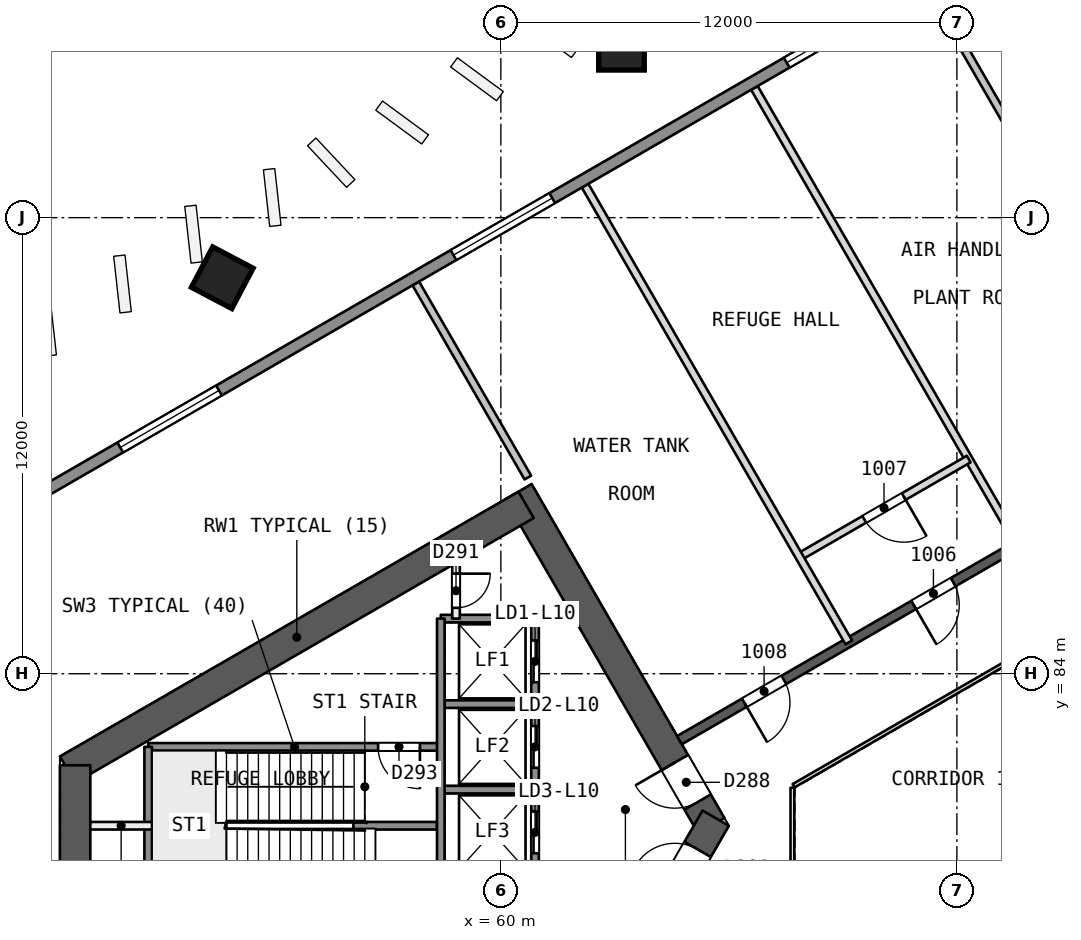
"""IFC4 building model, lengths in metres.
Left out: names, types, materials, properties, quantities, classifications, styles, units other than length and angle.
Written with IfcOpenShell. Run it as: python <this file> out.ifc"""

import sys

from ifc_helpers import new_model, si_unit, direction, frame, frame_2d, origin, origin_2d, place, context, subcontext, project, spatial, rectangle, extrude, element, fill, save


model = new_model("IFC4")
c1 = context("Model", 3, precision=1e-05, world=origin(), true_north=direction((0.0, 1.0)))
c2 = subcontext(c1, "Body", "Model", "MODEL_VIEW")
j1 = project(units=[si_unit("LENGTHUNIT", "METRE"), si_unit("PLANEANGLEUNIT", "RADIAN")], contexts=[c1])
p1 = place(None, origin())
s1 = spatial("IfcSite", under=j1, at=p1, CompositionType="ELEMENT")
p2 = place(p1, origin())
s2 = spatial("IfcBuilding", under=s1, at=p2, CompositionType="ELEMENT")
p3 = place(p2, frame((0.0, 0.0, 48.5)))
s3 = spatial("IfcBuildingStorey", under=s2, at=p3, CompositionType="ELEMENT", Elevation=48.5)
p4 = place(p3, frame((65.538, 80.0, 0.0), z_axis=(0.0, 0.0, 1.0), x_axis=(-0.49999662545, 0.866027352073, 0.0)))
e1 = element("IfcWall", 1, at=p4, inside=s3, PredefinedType="SHEAR", context=c2, shape_type="SweptSolid", body=[
    extrude(rectangle(XDim=10.149, YDim=0.8, at=frame_2d((5.074, 0.0))), origin(), (0.0, 0.0, 1.0), 4.4),
])
p5 = place(p4, frame((0.719, 0.0, 0.0)))
e2 = element("IfcOpeningElement", 2, at=p5, cuts=e1, PredefinedType="OPENING", context=c2, shape_type="SweptSolid", body=[
    extrude(rectangle(XDim=1.2, YDim=2.1, at=frame_2d((0.6, 1.05))), frame((0.0, 0.411, 0.0), z_axis=(0.0, -1.0, 0.0), x_axis=(1.0, 0.0, 0.0)), (0.0, 0.0, 1.0), 0.821),
])
p6 = place(p3, frame((60.664, 88.443, 0.0), z_axis=(0.0, 0.0, 1.0), x_axis=(-0.866029478545, -0.499992942241, 0.0)))
e3 = element("IfcWall", 3, at=p6, inside=s3, PredefinedType="SHEAR", context=c2, shape_type="SweptSolid", body=[
    extrude(rectangle(XDim=13.933, YDim=0.8, at=frame_2d((6.967, 0.0))), origin(), (0.0, 0.0, 1.0), 4.4),
])
p7 = place(p3, frame((48.797, 81.592, 0.0), z_axis=(0.0, 0.0, 1.0), x_axis=(0.0, -1.0, 0.0)))
e4 = element("IfcWall", 4, at=p7, inside=s3, PredefinedType="SHEAR", context=c2, shape_type="SweptSolid", body=[
    extrude(rectangle(XDim=3.415, YDim=0.8, at=frame_2d((1.707, 0.0))), origin(), (0.0, 0.0, 1.0), 4.4),
])
p8 = place(p3, frame((60.664, 71.557, 0.0), z_axis=(0.0, 0.0, 1.0), x_axis=(0.50000409368, 0.866023040284, 0.0)))
e5 = element("IfcWall", 5, at=p8, inside=s3, PredefinedType="SHEAR", context=c2, shape_type="SweptSolid", body=[
    extrude(rectangle(XDim=9.98, YDim=0.8, at=frame_2d((4.99, 0.0))), origin(), (0.0, 0.0, 1.0), 4.4),
])
p9 = place(p8, frame((7.83, 0.0, 0.0)))
e6 = element("IfcOpeningElement", 6, at=p9, cuts=e5, PredefinedType="OPENING", context=c2, shape_type="SweptSolid", body=[
    extrude(rectangle(XDim=1.2, YDim=2.1, at=frame_2d((0.6, 1.05))), frame((0.0, 0.411, 0.0), z_axis=(0.0, -1.0, 0.0), x_axis=(1.0, 0.0, 0.0)), (0.0, 0.0, 1.0), 0.821),
])
p10 = place(p3, frame((78.2, 90.046, 0.0), z_axis=(0.0, 0.0, 1.0), x_axis=(-0.866026492143, -0.499998114903, 0.0)))
e7 = element("IfcWall", 7, at=p10, inside=s3, PredefinedType="SHEAR", context=c2, shape_type="SweptSolid", body=[
    extrude(rectangle(XDim=15.588, YDim=0.25, at=frame_2d((7.794, 0.0))), origin(), (0.0, 0.0, 1.0), 3.9),
])
p11 = place(p10, frame((2.05, 0.0, 0.0)))
e8 = element("IfcOpeningElement", 8, at=p11, cuts=e7, PredefinedType="OPENING", context=c2, shape_type="SweptSolid", body=[
    extrude(rectangle(XDim=1.2, YDim=2.4, at=frame_2d((0.6, 1.2))), frame((0.0, 0.135, 0.0), z_axis=(0.0, -1.0, 0.0), x_axis=(1.0, 0.0, 0.0)), (0.0, 0.0, 1.0), 0.271),
])
p12 = place(p10, frame((7.272, 0.0, 0.0)))
e9 = element("IfcOpeningElement", 9, at=p12, cuts=e7, PredefinedType="OPENING", context=c2, shape_type="SweptSolid", body=[
    extrude(rectangle(XDim=1.2, YDim=2.4, at=frame_2d((0.6, 1.2))), frame((0.0, 0.135, 0.0), z_axis=(0.0, -1.0, 0.0), x_axis=(1.0, 0.0, 0.0)), (0.0, 0.0, 1.0), 0.271),
])
p13 = place(p10, frame((12.417, 0.0, 0.0)))
e10 = element("IfcOpeningElement", 10, at=p13, cuts=e7, PredefinedType="OPENING", context=c2, shape_type="SweptSolid", body=[
    extrude(rectangle(XDim=1.2, YDim=2.4, at=frame_2d((0.6, 1.2))), frame((0.0, 0.135, 0.0), z_axis=(0.0, -1.0, 0.0), x_axis=(1.0, 0.0, 0.0)), (0.0, 0.0, 1.0), 0.271),
])
p14 = place(p3, frame((63.162, 100.504, 0.0), z_axis=(0.010041240412, -0.017475086904, 0.999796876785), x_axis=(0.867052242695, 0.49821723017, 1.09398e-07)))
e11 = element("IfcColumn", 11, at=p14, inside=s3, PredefinedType="COLUMN", context=c2, shape_type="SweptSolid", body=[
    extrude(rectangle(XDim=1.2, YDim=1.2, at=origin_2d()), origin(), (0.0, 0.0, 1.0), 4.401),
])
p15 = place(p3, frame((52.646, 94.433, 0.0), z_axis=(0.019360161379, -0.012148639948, 0.999738763227), x_axis=(-0.500505187473, 0.865497615784, 0.020209759643)))
e12 = element("IfcColumn", 12, at=p15, inside=s3, PredefinedType="COLUMN", context=c2, shape_type="SweptSolid", body=[
    extrude(rectangle(XDim=1.2, YDim=1.2, at=origin_2d()), origin(), (0.0, 0.0, 1.0), 4.401),
])
p16 = place(p3, frame((66.671, 99.414, 0.0), z_axis=(0.0, 0.0, 1.0), x_axis=(0.500010269051, -0.866019474864, 0.0)))
e13 = element("IfcWall", 13, at=p16, inside=s3, PredefinedType="PARTITIONING", context=c2, shape_type="SweptSolid", body=[
    extrude(rectangle(XDim=13.878, YDim=0.2, at=frame_2d((6.939, 0.0))), origin(), (0.0, 0.0, 1.0), 3.9),
])
p17 = place(p3, frame((71.261, 102.064, 0.0), z_axis=(0.0, 0.0, 1.0), x_axis=(0.499985191823, -0.866033953121, 0.0)))
e14 = element("IfcWall", 14, at=p17, inside=s3, PredefinedType="PARTITIONING", context=c2, shape_type="SweptSolid", body=[
    extrude(rectangle(XDim=5.899, YDim=0.2, at=frame_2d((2.949, 0.0))), origin(), (0.0, 0.0, 1.0), 3.9),
])
p18 = place(p3, frame((72.31, 89.647, 0.0), z_axis=(0.0, 0.0, 1.0), x_axis=(-0.866035426308, -0.499982640079, 0.0)))
e15 = element("IfcWall", 15, at=p18, inside=s3, PredefinedType="PARTITIONING", context=c2, shape_type="SweptSolid", body=[
    extrude(rectangle(XDim=5.144, YDim=0.2, at=frame_2d((2.572, 0.0))), origin(), (0.0, 0.0, 1.0), 3.9),
])
p19 = place(p18, frame((1.972, 0.0, 0.0)))
e16 = element("IfcOpeningElement", 16, at=p19, cuts=e15, PredefinedType="OPENING", context=c2, shape_type="SweptSolid", body=[
    extrude(rectangle(XDim=1.2, YDim=2.4, at=frame_2d((0.6, 1.2))), frame((0.0, 0.11, 0.0), z_axis=(0.0, -1.0, 0.0), x_axis=(1.0, 0.0, 0.0)), (0.0, 0.0, 1.0), 0.221),
])
p20 = place(p3, frame((62.216, 96.842, 0.0), z_axis=(0.0, 0.0, 1.0), x_axis=(0.499997074782, -0.866027092653, 0.0)))
e17 = element("IfcWall", 17, at=p20, inside=s3, PredefinedType="PARTITIONING", context=c2, shape_type="SweptSolid", body=[
    extrude(rectangle(XDim=13.877, YDim=0.2, at=frame_2d((6.939, 0.0))), origin(), (0.0, 0.0, 1.0), 3.9),
])
p21 = place(p3, frame((60.71, 89.162, 0.0), z_axis=(0.0, 0.0, 1.0), x_axis=(-0.499985191823, 0.866033953121, 0.0)))
e18 = element("IfcWall", 18, at=p21, inside=s3, PredefinedType="PARTITIONING", context=c2, shape_type="SweptSolid", body=[
    extrude(rectangle(XDim=5.899, YDim=0.2, at=frame_2d((2.949, 0.0))), origin(), (0.0, 0.0, 1.0), 3.9),
])
p22 = place(p3, frame((38.131, 83.108, 0.0), z_axis=(0.0, 0.0, 1.0), x_axis=(0.866025105017, 0.50000051748, 0.0)))
e19 = element("IfcWall", 19, at=p22, inside=s3, PredefinedType="SOLIDWALL", context=c2, shape_type="SweptSolid", body=[
    extrude(rectangle(XDim=60.751, YDim=0.3, at=frame_2d((30.375, 0.0))), origin(), (0.0, 0.0, 1.0), 3.9),
])
p23 = place(p22, frame((3.562, 0.0, 0.6)))
e20 = element("IfcOpeningElement", 20, at=p23, cuts=e19, PredefinedType="OPENING", context=c2, shape_type="SweptSolid", body=[
    extrude(rectangle(XDim=3.0, YDim=2.4, at=frame_2d((1.5, 1.2))), frame((0.0, 0.161, 0.0), z_axis=(0.0, -1.0, 0.0), x_axis=(1.0, 0.0, 0.0)), (0.0, 0.0, 1.0), 0.321),
])
p24 = place(p22, frame((13.688, 0.0, 0.6)))
e21 = element("IfcOpeningElement", 21, at=p24, cuts=e19, PredefinedType="OPENING", context=c2, shape_type="SweptSolid", body=[
    extrude(rectangle(XDim=3.0, YDim=2.4, at=frame_2d((1.5, 1.2))), frame((0.0, 0.161, 0.0), z_axis=(0.0, -1.0, 0.0), x_axis=(1.0, 0.0, 0.0)), (0.0, 0.0, 1.0), 0.321),
])
p25 = place(p22, frame((23.813, 0.0, 0.6)))
e22 = element("IfcOpeningElement", 22, at=p25, cuts=e19, PredefinedType="OPENING", context=c2, shape_type="SweptSolid", body=[
    extrude(rectangle(XDim=3.0, YDim=2.4, at=frame_2d((1.5, 1.2))), frame((0.0, 0.161, 0.0), z_axis=(0.0, -1.0, 0.0), x_axis=(1.0, 0.0, 0.0)), (0.0, 0.0, 1.0), 0.321),
])
p26 = place(p22, frame((33.938, 0.0, 0.6)))
e23 = element("IfcOpeningElement", 23, at=p26, cuts=e19, PredefinedType="OPENING", context=c2, shape_type="SweptSolid", body=[
    extrude(rectangle(XDim=3.0, YDim=2.4, at=frame_2d((1.5, 1.2))), frame((0.0, 0.161, 0.0), z_axis=(0.0, -1.0, 0.0), x_axis=(1.0, 0.0, 0.0)), (0.0, 0.0, 1.0), 0.321),
])
p27 = place(p22, frame((44.063, 0.0, 0.6)))
e24 = element("IfcOpeningElement", 24, at=p27, cuts=e19, PredefinedType="OPENING", context=c2, shape_type="SweptSolid", body=[
    extrude(rectangle(XDim=3.0, YDim=2.4, at=frame_2d((1.5, 1.2))), frame((0.0, 0.161, 0.0), z_axis=(0.0, -1.0, 0.0), x_axis=(1.0, 0.0, 0.0)), (0.0, 0.0, 1.0), 0.321),
])
p28 = place(p22, frame((54.188, 0.0, 0.6)))
e25 = element("IfcOpeningElement", 25, at=p28, cuts=e19, PredefinedType="OPENING", context=c2, shape_type="SweptSolid", body=[
    extrude(rectangle(XDim=3.0, YDim=2.4, at=frame_2d((1.5, 1.2))), frame((0.0, 0.161, 0.0), z_axis=(0.0, -1.0, 0.0), x_axis=(1.0, 0.0, 0.0)), (0.0, 0.0, 1.0), 0.321),
])
for number, where, z_axis, x_axis in (
    (26, (60.9, 85.45, 0.0), (0.0, 0.0, 1.0), (-1.0, 0.0, 0.0)),
    (27, (60.9, 83.2, 0.0), (0.0, 0.0, 1.0), (-1.0, 0.0, 0.0)),
):
    element("IfcWall", number, at=place(p3, frame(where, z_axis=z_axis, x_axis=x_axis)), inside=s3, PredefinedType="SOLIDWALL", context=c2, shape_type="SweptSolid", body=[
        extrude(rectangle(XDim=2.48, YDim=0.2, at=frame_2d((1.24, 0.0))), origin(), (0.0, 0.0, 1.0), 3.9),
    ])
p29 = place(p3, frame((58.42, 82.075, 0.0), z_axis=(0.0, 0.0, 1.0), x_axis=(-1.0, 0.0, 0.0)))
e28 = element("IfcWall", 28, at=p29, inside=s3, PredefinedType="SOLIDWALL", context=c2, shape_type="SweptSolid", body=[
    extrude(rectangle(XDim=7.7, YDim=0.2, at=frame_2d((3.85, 0.0))), origin(), (0.0, 0.0, 1.0), 3.9),
])
p30 = place(p29, frame((0.55, 0.0, 0.0)))
e29 = element("IfcOpeningElement", 29, at=p30, cuts=e28, PredefinedType="OPENING", context=c2, shape_type="SweptSolid", body=[
    extrude(rectangle(XDim=1.1, YDim=2.1, at=frame_2d((0.55, 1.05))), frame((0.0, 0.11, 0.0), z_axis=(0.0, -1.0, 0.0), x_axis=(1.0, 0.0, 0.0)), (0.0, 0.0, 1.0), 0.221),
])
p31 = place(p3, frame((60.9, 80.95, 0.0), z_axis=(0.0, 0.0, 1.0), x_axis=(-1.0, 0.0, 0.0)))
e30 = element("IfcWall", 30, at=p31, inside=s3, PredefinedType="SOLIDWALL", context=c2, shape_type="SweptSolid", body=[
    extrude(rectangle(XDim=2.48, YDim=0.2, at=frame_2d((1.24, 0.0))), origin(), (0.0, 0.0, 1.0), 3.9),
])
p32 = place(p3, frame((58.32, 80.0, 0.0), z_axis=(0.0, 0.0, 1.0), x_axis=(-1.0, 0.0, 0.0)))
e31 = element("IfcWall", 31, at=p32, inside=s3, PredefinedType="SOLIDWALL", context=c2, shape_type="SweptSolid", body=[
    extrude(rectangle(XDim=2.2, YDim=0.2, at=frame_2d((1.1, 0.0))), origin(), (0.0, 0.0, 1.0), 3.9),
])
p33 = place(p3, frame((50.82, 80.0, 0.0), z_axis=(0.0, 0.0, 1.0), x_axis=(-1.0, 0.0, 0.0)))
e32 = element("IfcWall", 32, at=p33, inside=s3, PredefinedType="PARTITIONING", context=c2, shape_type="SweptSolid", body=[
    extrude(rectangle(XDim=1.623, YDim=0.2, at=frame_2d((0.812, 0.0))), origin(), (0.0, 0.0, 1.0), 3.9),
])
p34 = place(p3, frame((60.9, 85.45, 0.0), z_axis=(0.0, 0.0, 1.0), x_axis=(0.0, -1.0, 0.0)))
e33 = element("IfcWall", 33, at=p34, inside=s3, PredefinedType="SOLIDWALL", context=c2, shape_type="SweptSolid", body=[
    extrude(rectangle(XDim=10.9, YDim=0.2, at=frame_2d((5.45, 0.0))), origin(), (0.0, 0.0, 1.0), 3.9),
])
p35 = place(p34, frame((0.575, 0.0, 0.0)))
e34 = element("IfcOpeningElement", 34, at=p35, cuts=e33, PredefinedType="OPENING", context=c2, shape_type="SweptSolid", body=[
    extrude(rectangle(XDim=1.1, YDim=2.1, at=frame_2d((0.55, 1.05))), frame((0.0, 0.11, 0.0), z_axis=(0.0, -1.0, 0.0), x_axis=(1.0, 0.0, 0.0)), (0.0, 0.0, 1.0), 0.221),
])
p36 = place(p34, frame((2.825, 0.0, 0.0)))
e35 = element("IfcOpeningElement", 35, at=p36, cuts=e33, PredefinedType="OPENING", context=c2, shape_type="SweptSolid", body=[
    extrude(rectangle(XDim=1.1, YDim=2.1, at=frame_2d((0.55, 1.05))), frame((0.0, 0.11, 0.0), z_axis=(0.0, -1.0, 0.0), x_axis=(1.0, 0.0, 0.0)), (0.0, 0.0, 1.0), 0.221),
])
p37 = place(p34, frame((5.075, 0.0, 0.0)))
e36 = element("IfcOpeningElement", 36, at=p37, cuts=e33, PredefinedType="OPENING", context=c2, shape_type="SweptSolid", body=[
    extrude(rectangle(XDim=1.1, YDim=2.1, at=frame_2d((0.55, 1.05))), frame((0.0, 0.11, 0.0), z_axis=(0.0, -1.0, 0.0), x_axis=(1.0, 0.0, 0.0)), (0.0, 0.0, 1.0), 0.221),
])
p38 = place(p34, frame((7.325, 0.0, 0.0)))
e37 = element("IfcOpeningElement", 37, at=p38, cuts=e33, PredefinedType="OPENING", context=c2, shape_type="SweptSolid", body=[
    extrude(rectangle(XDim=1.1, YDim=2.1, at=frame_2d((0.55, 1.05))), frame((0.0, 0.11, 0.0), z_axis=(0.0, -1.0, 0.0), x_axis=(1.0, 0.0, 0.0)), (0.0, 0.0, 1.0), 0.221),
])
p39 = place(p3, frame((58.82, 86.917, 0.0), z_axis=(0.0, 0.0, 1.0), x_axis=(0.0, -1.0, 0.0)))
e38 = element("IfcWall", 38, at=p39, inside=s3, PredefinedType="PARTITIONING", context=c2, shape_type="SweptSolid", body=[
    extrude(rectangle(XDim=1.467, YDim=0.2, at=frame_2d((0.733, 0.0))), origin(), (0.0, 0.0, 1.0), 3.9),
])
p40 = place(p39, frame((0.283, 0.0, 0.0)))
e39 = element("IfcOpeningElement", 39, at=p40, cuts=e38, PredefinedType="OPENING", context=c2, shape_type="SweptSolid", body=[
    extrude(rectangle(XDim=0.9, YDim=2.1, at=frame_2d((0.45, 1.05))), frame((0.0, 0.11, 0.0), z_axis=(0.0, -1.0, 0.0), x_axis=(1.0, 0.0, 0.0)), (0.0, 0.0, 1.0), 0.221),
])
p41 = place(p3, frame((58.42, 85.45, 0.0), z_axis=(0.0, 0.0, 1.0), x_axis=(0.0, -1.0, 0.0)))
e40 = element("IfcWall", 40, at=p41, inside=s3, PredefinedType="SOLIDWALL", context=c2, shape_type="SweptSolid", body=[
    extrude(rectangle(XDim=9.0, YDim=0.2, at=frame_2d((4.5, 0.0))), origin(), (0.0, 0.0, 1.0), 3.9),
])
p42 = place(p3, frame((50.72, 82.075, 0.0), z_axis=(0.0, 0.0, 1.0), x_axis=(0.0, -1.0, 0.0)))
e41 = element("IfcWall", 41, at=p42, inside=s3, PredefinedType="SOLIDWALL", context=c2, shape_type="SweptSolid", body=[
    extrude(rectangle(XDim=4.15, YDim=0.2, at=frame_2d((2.075, 0.0))), origin(), (0.0, 0.0, 1.0), 3.9),
])
p43 = place(p3, frame((77.738, 86.846, 0.0), z_axis=(0.0, 0.0, 1.0), x_axis=(-0.866026658274, -0.499997827154, 0.0)))
e42 = element("IfcWall", 42, at=p43, inside=s3, PredefinedType="PARTITIONING", context=c2, shape_type="SweptSolid", body=[
    extrude(rectangle(XDim=11.588, YDim=0.1, at=frame_2d((5.794, 0.0))), origin(), (0.0, 0.0, 1.0), 3.9),
])
p44 = place(p3, frame((67.672, 81.0, 0.0), z_axis=(0.0, 0.0, 1.0), x_axis=(0.0, -1.0, 0.0)))
e43 = element("IfcWall", 43, at=p44, inside=s3, PredefinedType="PARTITIONING", context=c2, shape_type="SweptSolid", body=[
    extrude(rectangle(XDim=2.0, YDim=0.1, at=frame_2d((1.0, 0.0))), origin(), (0.0, 0.0, 1.0), 3.9),
])
p45 = place(p12, origin())
e44 = element("IfcDoor", 44, at=p45, inside=s3, OperationType="SINGLE_SWING_RIGHT", PredefinedType="NOTDEFINED", context=c2, shape_type="SweptSolid", body=[
    extrude(rectangle(XDim=1.2, YDim=2.4, at=frame_2d((0.6, 1.2))), frame((0.0, 0.025, 0.0), z_axis=(0.0, -1.0, 0.0), x_axis=(1.0, 0.0, 0.0)), (0.0, 0.0, 1.0), 0.05),
])
fill(e9, e44)
p46 = place(p19, origin())
e45 = element("IfcDoor", 45, at=p46, inside=s3, OperationType="SINGLE_SWING_LEFT", PredefinedType="NOTDEFINED", context=c2, shape_type="SweptSolid", body=[
    extrude(rectangle(XDim=1.2, YDim=2.4, at=frame_2d((0.6, 1.2))), frame((0.0, 0.025, 0.0), z_axis=(0.0, -1.0, 0.0), x_axis=(1.0, 0.0, 0.0)), (0.0, 0.0, 1.0), 0.05),
])
fill(e16, e45)
p47 = place(p13, origin())
e46 = element("IfcDoor", 46, at=p47, inside=s3, OperationType="SINGLE_SWING_RIGHT", PredefinedType="NOTDEFINED", context=c2, shape_type="SweptSolid", body=[
    extrude(rectangle(XDim=1.2, YDim=2.4, at=frame_2d((0.6, 1.2))), frame((0.0, 0.025, 0.0), z_axis=(0.0, -1.0, 0.0), x_axis=(1.0, 0.0, 0.0)), (0.0, 0.0, 1.0), 0.05),
])
fill(e10, e46)
p48 = place(p24, origin())
e47 = element("IfcWindow", 47, at=p48, inside=s3, PartitioningType="SINGLE_PANEL", PredefinedType="WINDOW", context=c2, shape_type="SweptSolid", body=[
    extrude(rectangle(XDim=3.0, YDim=2.4, at=frame_2d((1.5, 1.2))), frame((0.0, 0.03, 0.0), z_axis=(0.0, -1.0, 0.0), x_axis=(1.0, 0.0, 0.0)), (0.0, 0.0, 1.0), 0.06),
])
fill(e21, e47)
p49 = place(p25, origin())
e48 = element("IfcWindow", 48, at=p49, inside=s3, PartitioningType="SINGLE_PANEL", PredefinedType="WINDOW", context=c2, shape_type="SweptSolid", body=[
    extrude(rectangle(XDim=3.0, YDim=2.4, at=frame_2d((1.5, 1.2))), frame((0.0, 0.03, 0.0), z_axis=(0.0, -1.0, 0.0), x_axis=(1.0, 0.0, 0.0)), (0.0, 0.0, 1.0), 0.06),
])
fill(e22, e48)
p50 = place(p26, origin())
e49 = element("IfcWindow", 49, at=p50, inside=s3, PartitioningType="SINGLE_PANEL", PredefinedType="WINDOW", context=c2, shape_type="SweptSolid", body=[
    extrude(rectangle(XDim=3.0, YDim=2.4, at=frame_2d((1.5, 1.2))), frame((0.0, 0.03, 0.0), z_axis=(0.0, -1.0, 0.0), x_axis=(1.0, 0.0, 0.0)), (0.0, 0.0, 1.0), 0.06),
])
fill(e23, e49)
p51 = place(p5, origin())
e50 = element("IfcDoor", 50, at=p51, inside=s3, OperationType="SINGLE_SWING_RIGHT", PredefinedType="NOTDEFINED", context=c2, shape_type="SweptSolid", body=[
    extrude(rectangle(XDim=1.2, YDim=2.1, at=frame_2d((0.6, 1.05))), frame((0.0, 0.025, 0.0), z_axis=(0.0, -1.0, 0.0), x_axis=(1.0, 0.0, 0.0)), (0.0, 0.0, 1.0), 0.05),
])
fill(e2, e50)
p52 = place(p9, origin())
e51 = element("IfcDoor", 51, at=p52, inside=s3, OperationType="SINGLE_SWING_LEFT", PredefinedType="NOTDEFINED", context=c2, shape_type="SweptSolid", body=[
    extrude(rectangle(XDim=1.2, YDim=2.1, at=frame_2d((0.6, 1.05))), frame((0.0, 0.025, 0.0), z_axis=(0.0, -1.0, 0.0), x_axis=(1.0, 0.0, 0.0)), (0.0, 0.0, 1.0), 0.05),
])
fill(e6, e51)
p53 = place(p35, origin())
e52 = element("IfcDoor", 52, at=p53, inside=s3, OperationType="SLIDING_TO_RIGHT", PredefinedType="NOTDEFINED", context=c2, shape_type="SweptSolid", body=[
    extrude(rectangle(XDim=1.1, YDim=2.1, at=frame_2d((0.55, 1.05))), frame((0.0, 0.025, 0.0), z_axis=(0.0, -1.0, 0.0), x_axis=(1.0, 0.0, 0.0)), (0.0, 0.0, 1.0), 0.05),
])
fill(e34, e52)
p54 = place(p36, origin())
e53 = element("IfcDoor", 53, at=p54, inside=s3, OperationType="SLIDING_TO_LEFT", PredefinedType="NOTDEFINED", context=c2, shape_type="SweptSolid", body=[
    extrude(rectangle(XDim=1.1, YDim=2.1, at=frame_2d((0.55, 1.05))), frame((0.0, 0.025, 0.0), z_axis=(0.0, -1.0, 0.0), x_axis=(1.0, 0.0, 0.0)), (0.0, 0.0, 1.0), 0.05),
])
fill(e35, e53)
p55 = place(p37, origin())
e54 = element("IfcDoor", 54, at=p55, inside=s3, OperationType="SLIDING_TO_RIGHT", PredefinedType="NOTDEFINED", context=c2, shape_type="SweptSolid", body=[
    extrude(rectangle(XDim=1.1, YDim=2.1, at=frame_2d((0.55, 1.05))), frame((0.0, 0.025, 0.0), z_axis=(0.0, -1.0, 0.0), x_axis=(1.0, 0.0, 0.0)), (0.0, 0.0, 1.0), 0.05),
])
fill(e36, e54)
p56 = place(p40, origin())
e55 = element("IfcDoor", 55, at=p56, inside=s3, OperationType="SINGLE_SWING_LEFT", PredefinedType="NOTDEFINED", context=c2, shape_type="SweptSolid", body=[
    extrude(rectangle(XDim=0.9, YDim=2.1, at=frame_2d((0.45, 1.05))), frame((0.0, 0.025, 0.0), z_axis=(0.0, -1.0, 0.0), x_axis=(1.0, 0.0, 0.0)), (0.0, 0.0, 1.0), 0.05),
])
fill(e39, e55)
p57 = place(p30, origin())
e56 = element("IfcDoor", 56, at=p57, inside=s3, OperationType="SINGLE_SWING_LEFT", PredefinedType="NOTDEFINED", context=c2, shape_type="SweptSolid", body=[
    extrude(rectangle(XDim=1.1, YDim=2.1, at=frame_2d((0.55, 1.05))), frame((0.0, 0.025, 0.0), z_axis=(0.0, -1.0, 0.0), x_axis=(1.0, 0.0, 0.0)), (0.0, 0.0, 1.0), 0.05),
])
fill(e29, e56)
save(model, sys.argv[1])
